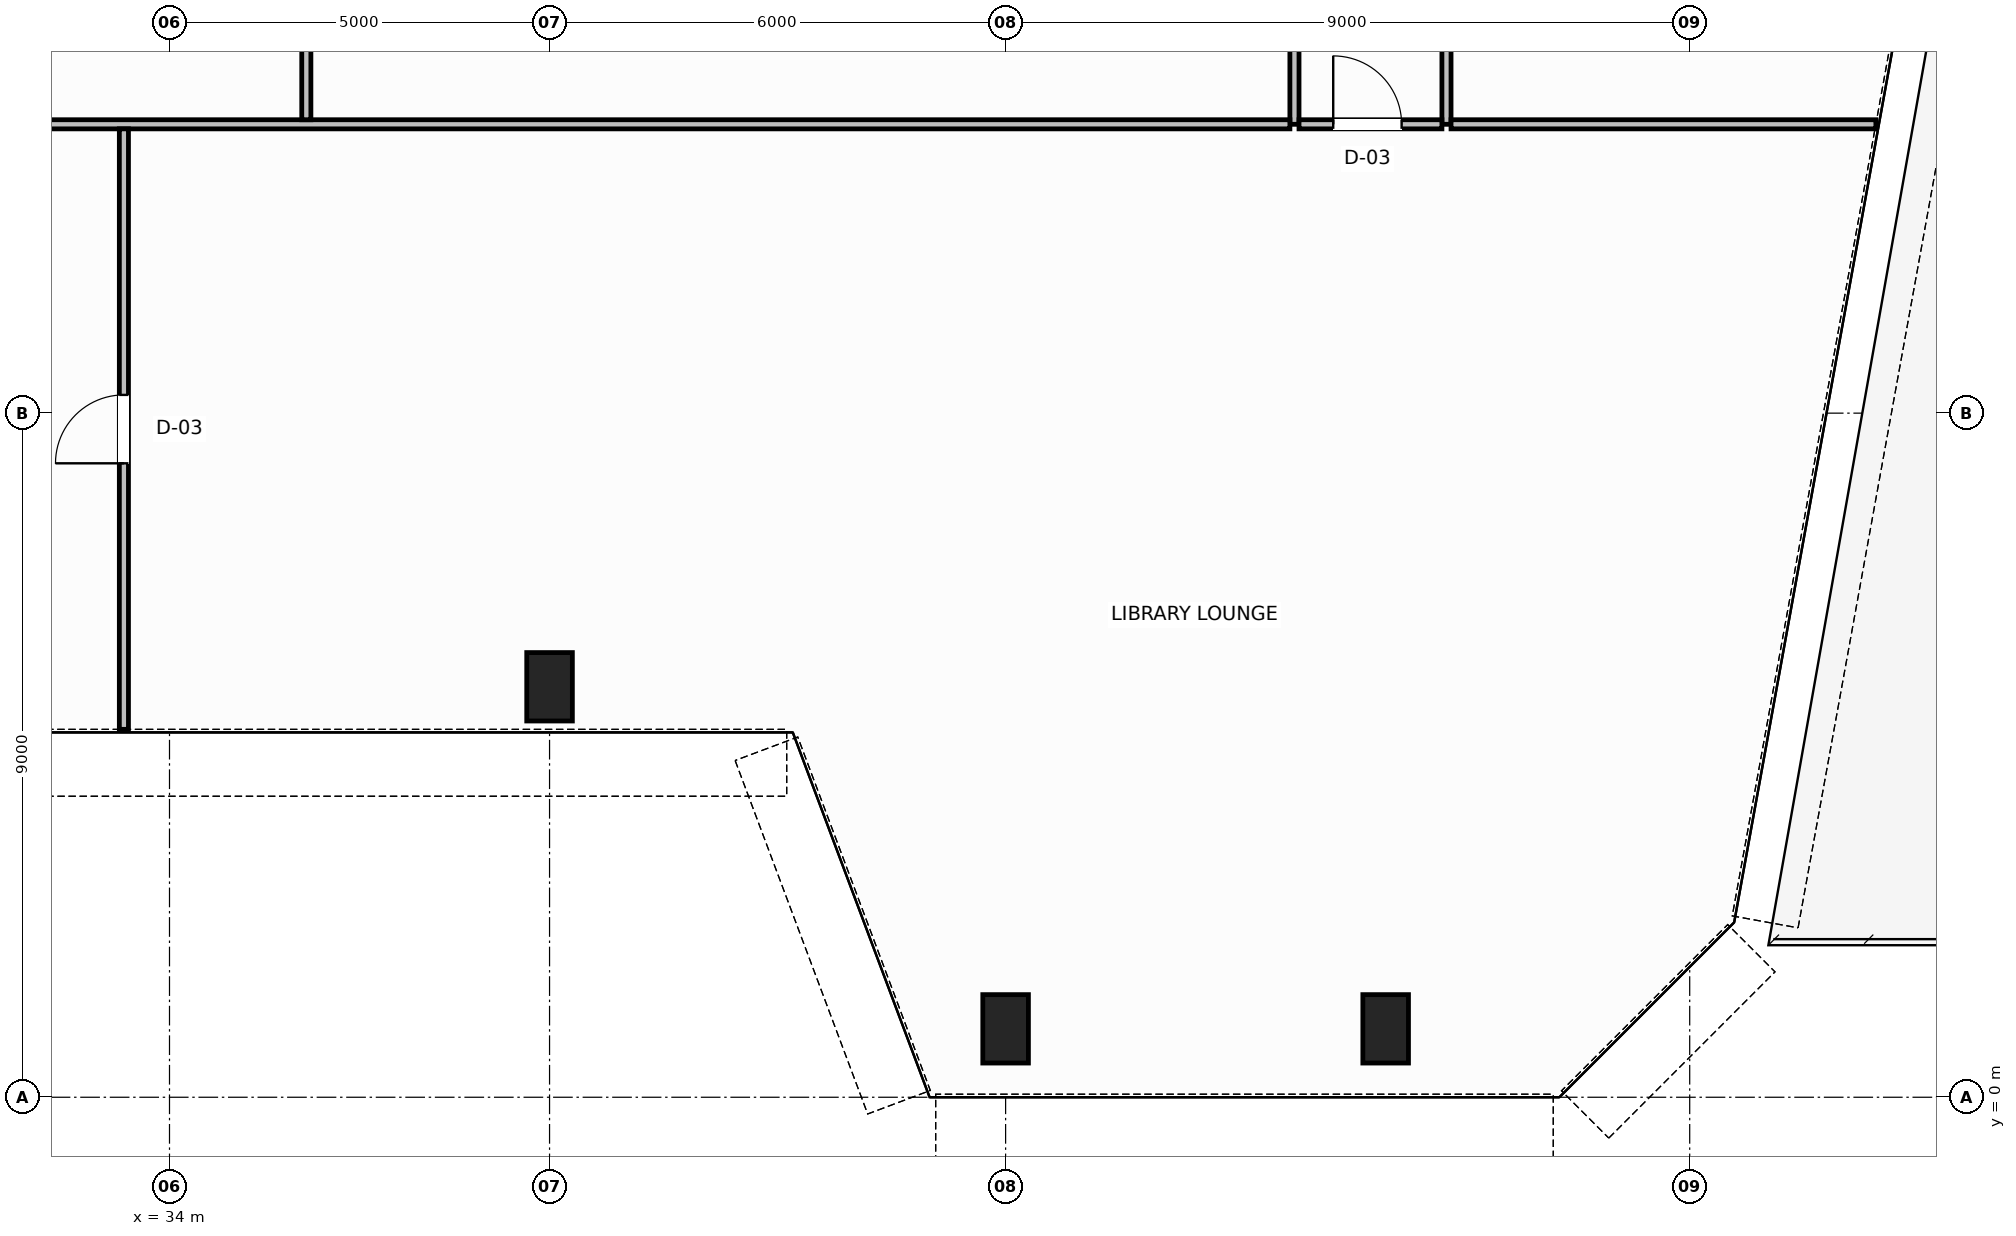
"""IFC4 building model, lengths in metres.
Left out: names, types, materials, properties, quantities, classifications, styles, units other than length and angle.
Written with IfcOpenShell. Run it as: python <this file> out.ifc"""

import sys

from ifc_helpers import new_model, si_unit, direction, frame, frame_2d, origin, origin_2d, place, context, subcontext, project, spatial, rectangle, hollow_rectangle, extrude, source, transform, mapped, element, fill, save


model = new_model("IFC4")
c1 = context("Model", 3, precision=1e-05, world=origin(), true_north=direction((0.0, 1.0)))
c2 = subcontext(c1, "Body", "Model", "MODEL_VIEW")
j1 = project(units=[si_unit("LENGTHUNIT", "METRE"), si_unit("PLANEANGLEUNIT", "RADIAN")], contexts=[c1])
p1 = place(None, origin())
s1 = spatial("IfcSite", under=j1, at=p1, CompositionType="ELEMENT")
p2 = place(p1, origin())
s2 = spatial("IfcBuilding", under=s1, at=p2, CompositionType="ELEMENT")
p3 = place(p2, frame((0.0, 0.0, 18.8)))
s3 = spatial("IfcBuildingStorey", under=s2, at=p3, CompositionType="ELEMENT", Elevation=18.8)
m1 = source(origin(), c2, "Body", "SweptSolid", [
    extrude(hollow_rectangle(XDim=0.6, YDim=0.9, WallThickness=0.04, InnerFilletRadius=0.04, OuterFilletRadius=0.08, at=origin_2d()), origin(), (0.0, 0.0, 1.0), 3.744),
])
for number, where, z_axis, x_axis in (
    (1, (39.0, 5.4, 0.032), (0.0, 0.064, 0.998), (-1.0, 0.0, 0.0)),
    (2, (45.0, 0.9, 0.032), (0.0, 0.064, 0.998), (-1.0, 0.0, 0.0)),
    (3, (50.0, 0.9, 0.032), (0.0, 0.064, 0.998), (-1.0, 0.0, 0.0)),
):
    element("IfcColumn", number, at=place(p3, frame(where, z_axis=z_axis, x_axis=x_axis)), inside=s3, PredefinedType="COLUMN", context=c2, shape_type="MappedRepresentation", body=[
        mapped(m1, transform((0.0, 0.0, 0.0), scale=1.0)),
    ])
p4 = place(p3, frame((48.8, 12.8, 0.0), z_axis=(0.0, 0.0, 1.0), x_axis=(0.0, 1.0, 0.0)))
e4 = element("IfcWall", 4, at=p4, inside=s3, PredefinedType="PARTITIONING", context=c2, shape_type="SweptSolid", body=[
    extrude(rectangle(XDim=21.24, YDim=0.12, at=frame_2d((10.62, 0.0))), origin(), (0.0, 0.0, 1.0), 3.58),
])
p5 = place(p3, frame((50.8, 12.8, 0.0), z_axis=(0.0, 0.0, 1.0), x_axis=(0.0, 1.0, 0.0)))
e5 = element("IfcWall", 5, at=p5, inside=s3, PredefinedType="PARTITIONING", context=c2, shape_type="SweptSolid", body=[
    extrude(rectangle(XDim=21.24, YDim=0.12, at=frame_2d((10.62, 0.0))), origin(), (0.0, 0.0, 1.0), 3.58),
])
p6 = place(p5, frame((3.45, 0.0, 0.0)))
e6 = element("IfcOpeningElement", 6, at=p6, cuts=e5, PredefinedType="OPENING", context=c2, shape_type="SweptSolid", body=[
    extrude(rectangle(XDim=0.9, YDim=2.15, at=frame_2d((0.45, 1.075))), frame((0.0, 0.07, 0.0), z_axis=(0.0, -1.0, 0.0), x_axis=(1.0, 0.0, 0.0)), (0.0, 0.0, 1.0), 0.14),
])
p7 = place(p5, frame((11.95, 0.0, 0.0)))
e7 = element("IfcOpeningElement", 7, at=p7, cuts=e5, PredefinedType="OPENING", context=c2, shape_type="SweptSolid", body=[
    extrude(rectangle(XDim=0.9, YDim=2.15, at=frame_2d((0.45, 1.075))), frame((0.0, 0.07, 0.0), z_axis=(0.0, -1.0, 0.0), x_axis=(1.0, 0.0, 0.0)), (0.0, 0.0, 1.0), 0.14),
])
p8 = place(p5, frame((18.67, 0.0, 0.0)))
e8 = element("IfcOpeningElement", 8, at=p8, cuts=e5, PredefinedType="OPENING", context=c2, shape_type="SweptSolid", body=[
    extrude(rectangle(XDim=0.9, YDim=2.15, at=frame_2d((0.45, 1.075))), frame((0.0, 0.07, 0.0), z_axis=(0.0, -1.0, 0.0), x_axis=(1.0, 0.0, 0.0)), (0.0, 0.0, 1.0), 0.14),
])
p9 = place(p3, frame((48.86, 12.8, 0.0), z_axis=(0.0, 0.0, 1.0), x_axis=(1.0, 0.0, 0.0)))
e9 = element("IfcWall", 9, at=p9, inside=s3, PredefinedType="PARTITIONING", context=c2, shape_type="SweptSolid", body=[
    extrude(rectangle(XDim=1.88, YDim=0.12, at=frame_2d((0.94, 0.0))), origin(), (0.0, 0.0, 1.0), 3.58),
])
p10 = place(p9, frame((0.45, 0.0, 0.0)))
e10 = element("IfcOpeningElement", 10, at=p10, cuts=e9, PredefinedType="OPENING", context=c2, shape_type="SweptSolid", body=[
    extrude(rectangle(XDim=0.9, YDim=2.15, at=frame_2d((0.45, 1.075))), frame((0.0, 0.07, 0.0), z_axis=(0.0, -1.0, 0.0), x_axis=(1.0, 0.0, 0.0)), (0.0, 0.0, 1.0), 0.14),
])
p11 = place(p3, frame((50.86, 12.8, 0.0), z_axis=(0.0, 0.0, 1.0), x_axis=(1.0, 0.0, 0.0)))
e11 = element("IfcWall", 11, at=p11, inside=s3, PredefinedType="PARTITIONING", context=c2, shape_type="SweptSolid", body=[
    extrude(rectangle(XDim=5.589, YDim=0.12, at=frame_2d((2.794, 0.0))), origin(), (0.0, 0.0, 1.0), 3.58),
])
p12 = place(p3, frame((19.26, 12.8, 0.0), z_axis=(0.0, 0.0, 1.0), x_axis=(1.0, 0.0, 0.0)))
e12 = element("IfcWall", 12, at=p12, inside=s3, PredefinedType="PARTITIONING", context=c2, shape_type="SweptSolid", body=[
    extrude(rectangle(XDim=29.48, YDim=0.12, at=frame_2d((14.74, 0.0))), origin(), (0.0, 0.0, 1.0), 3.58),
])
p13 = place(p3, frame((35.8, 12.86, 0.0), z_axis=(0.0, 0.0, 1.0), x_axis=(0.0, 1.0, 0.0)))
e13 = element("IfcWall", 13, at=p13, inside=s3, PredefinedType="PARTITIONING", context=c2, shape_type="SweptSolid", body=[
    extrude(rectangle(XDim=21.18, YDim=0.12, at=frame_2d((10.59, 0.0))), origin(), (0.0, 0.0, 1.0), 3.58),
])
p14 = place(p3, frame((33.4, 4.84, 0.0), z_axis=(0.0, 0.0, 1.0), x_axis=(0.0, 1.0, 0.0)))
e14 = element("IfcWall", 14, at=p14, inside=s3, PredefinedType="PARTITIONING", context=c2, shape_type="SweptSolid", body=[
    extrude(rectangle(XDim=7.9, YDim=0.12, at=frame_2d((3.95, 0.0))), origin(), (0.0, 0.0, 1.0), 3.58),
])
p15 = place(p14, frame((3.5, 0.0, 0.0)))
e15 = element("IfcOpeningElement", 15, at=p15, cuts=e14, PredefinedType="OPENING", context=c2, shape_type="SweptSolid", body=[
    extrude(rectangle(XDim=0.9, YDim=2.15, at=frame_2d((0.45, 1.075))), frame((0.0, 0.07, 0.0), z_axis=(0.0, -1.0, 0.0), x_axis=(1.0, 0.0, 0.0)), (0.0, 0.0, 1.0), 0.14),
])
m2 = source(origin(), c2, "Body", "SweptSolid", [
    extrude(rectangle(XDim=0.9, YDim=2.15, at=frame_2d((0.45, 1.075))), frame((0.0, 0.025, 0.0), z_axis=(0.0, -1.0, 0.0), x_axis=(1.0, 0.0, 0.0)), (0.0, 0.0, 1.0), 0.05),
])
p16 = place(p15, origin())
e16 = element("IfcDoor", 16, at=p16, inside=s3, OperationType="SINGLE_SWING_RIGHT", PredefinedType="DOOR", context=c2, shape_type="MappedRepresentation", body=[
    mapped(m2, transform((0.0, 0.0, 0.0), scale=1.0)),
])
fill(e15, e16)
p17 = place(p10, origin())
e17 = element("IfcDoor", 17, at=p17, inside=s3, OperationType="SINGLE_SWING_RIGHT", PredefinedType="DOOR", context=c2, shape_type="MappedRepresentation", body=[
    mapped(m2, transform((0.0, 0.0, 0.0), scale=1.0)),
])
fill(e10, e17)
save(model, sys.argv[1])
